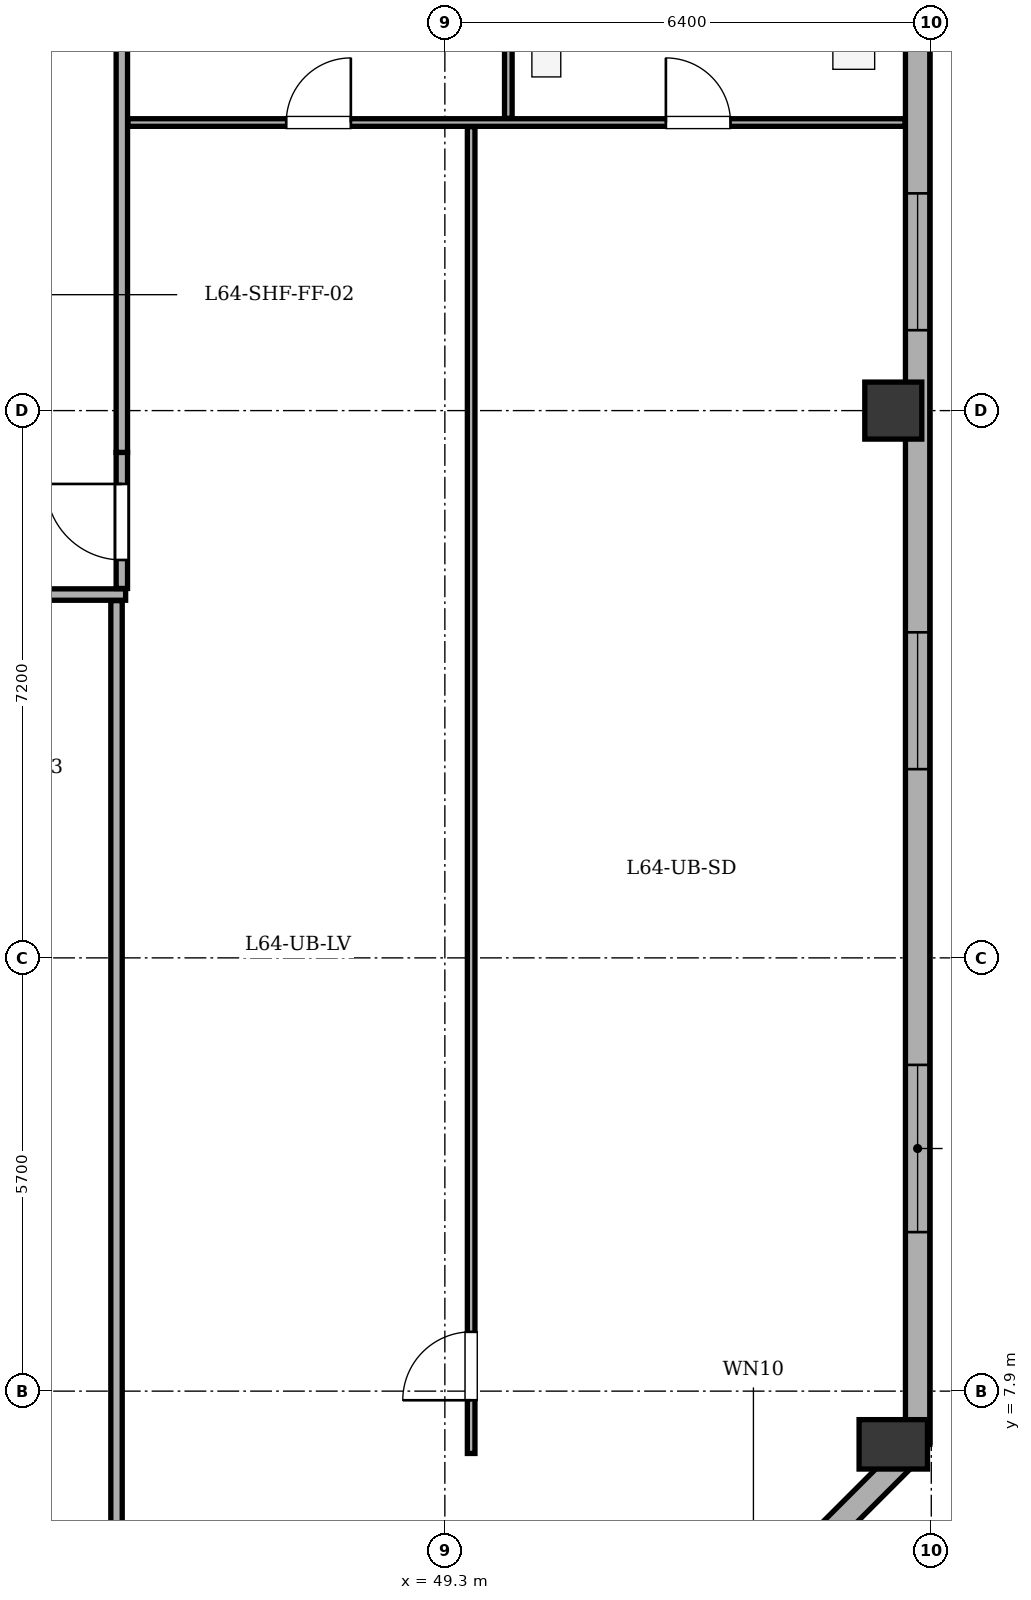
"""IFC4 building model, lengths in metres.
Left out: names, types, materials, properties, quantities, classifications, styles, units other than length and angle.
Written with IfcOpenShell. Run it as: python <this file> out.ifc"""

import sys

from ifc_helpers import new_model, si_unit, direction, frame, frame_2d, origin, origin_2d, place, context, subcontext, project, spatial, rectangle, extrude, element, fill, save


model = new_model("IFC4")
c1 = context("Model", 3, precision=1e-05, world=origin(), true_north=direction((0.0, 1.0)))
c2 = subcontext(c1, "Body", "Model", "MODEL_VIEW")
j1 = project(units=[si_unit("LENGTHUNIT", "METRE"), si_unit("PLANEANGLEUNIT", "RADIAN")], contexts=[c1])
p1 = place(None, origin())
s1 = spatial("IfcSite", under=j1, at=p1, CompositionType="ELEMENT")
p2 = place(p1, origin())
s2 = spatial("IfcBuilding", under=s1, at=p2, CompositionType="ELEMENT")
p3 = place(p2, frame((0.0, 0.0, 244.9)))
s3 = spatial("IfcBuildingStorey", under=s2, at=p3, CompositionType="ELEMENT", Elevation=244.9)
p4 = place(p3, frame((55.2, 7.2, 0.0), z_axis=(0.0, 0.0, 1.0), x_axis=(1.0, 0.0, 0.0)))
e1 = element("IfcColumn", 1, at=p4, inside=s3, PredefinedType="COLUMN", context=c2, shape_type="SweptSolid", body=[
    extrude(rectangle(XDim=0.65, YDim=0.9, at=origin_2d()), origin(), (0.0, 0.0, 1.0), 3.4),
])
p5 = place(p3, frame((55.2, 20.8, 0.0), z_axis=(0.0, 0.0, 1.0), x_axis=(1.0, 0.0, 0.0)))
e2 = element("IfcColumn", 2, at=p5, inside=s3, PredefinedType="COLUMN", context=c2, shape_type="SweptSolid", body=[
    extrude(rectangle(XDim=0.75, YDim=0.75, at=origin_2d()), origin(), (0.0, 0.0, 1.0), 3.4),
])
p6 = place(p3, frame((55.52, 35.0, 0.0), z_axis=(0.0, 0.0, 1.0), x_axis=(0.0, -1.0, 0.0)))
e3 = element("IfcWall", 3, at=p6, inside=s3, PredefinedType="STANDARD", context=c2, shape_type="SweptSolid", body=[
    extrude(rectangle(XDim=27.8, YDim=0.32, at=frame_2d((13.9, 0.0))), origin(), (0.0, 0.0, 1.0), 2.335),
])
p7 = place(p6, frame((2.458, 0.0, 0.75)))
e4 = element("IfcOpeningElement", 4, at=p7, cuts=e3, PredefinedType="OPENING", context=c2, shape_type="SweptSolid", body=[
    extrude(rectangle(XDim=1.8, YDim=1.465, at=frame_2d((0.9, 0.732))), frame((0.0, 0.17, 0.0), z_axis=(0.0, -1.0, 0.0), x_axis=(1.0, 0.0, 0.0)), (0.0, 0.0, 1.0), 0.34),
])
p8 = place(p6, frame((11.342, 0.0, 0.75)))
e5 = element("IfcOpeningElement", 5, at=p8, cuts=e3, PredefinedType="OPENING", context=c2, shape_type="SweptSolid", body=[
    extrude(rectangle(XDim=1.8, YDim=1.465, at=frame_2d((0.9, 0.732))), frame((0.0, 0.17, 0.0), z_axis=(0.0, -1.0, 0.0), x_axis=(1.0, 0.0, 0.0)), (0.0, 0.0, 1.0), 0.34),
])
p9 = place(p6, frame((17.117, 0.0, 0.75)))
e6 = element("IfcOpeningElement", 6, at=p9, cuts=e3, PredefinedType="OPENING", context=c2, shape_type="SweptSolid", body=[
    extrude(rectangle(XDim=1.8, YDim=1.465, at=frame_2d((0.9, 0.732))), frame((0.0, 0.17, 0.0), z_axis=(0.0, -1.0, 0.0), x_axis=(1.0, 0.0, 0.0)), (0.0, 0.0, 1.0), 0.34),
])
p10 = place(p6, frame((22.808, 0.0, 0.75)))
e7 = element("IfcOpeningElement", 7, at=p10, cuts=e3, PredefinedType="OPENING", context=c2, shape_type="SweptSolid", body=[
    extrude(rectangle(XDim=2.2, YDim=1.465, at=frame_2d((1.1, 0.732))), frame((0.0, 0.17, 0.0), z_axis=(0.0, -1.0, 0.0), x_axis=(1.0, 0.0, 0.0)), (0.0, 0.0, 1.0), 0.34),
])
p11 = place(p3, frame((55.52, 7.2, 0.0), z_axis=(0.0, 0.0, 1.0), x_axis=(-0.707106781187, -0.707106781187, 0.0)))
e8 = element("IfcWall", 8, at=p11, inside=s3, PredefinedType="STANDARD", context=c2, shape_type="SweptSolid", body=[
    extrude(rectangle(XDim=6.11, YDim=0.32, at=frame_2d((3.055, 0.0))), origin(), (0.0, 0.0, 1.0), 2.335),
])
p12 = place(p11, frame((2.355, 0.0, 0.75)))
e9 = element("IfcOpeningElement", 9, at=p12, cuts=e8, PredefinedType="OPENING", context=c2, shape_type="SweptSolid", body=[
    extrude(rectangle(XDim=1.4, YDim=1.465, at=frame_2d((0.7, 0.732))), frame((0.0, 0.17, 0.0), z_axis=(0.0, -1.0, 0.0), x_axis=(1.0, 0.0, 0.0)), (0.0, 0.0, 1.0), 0.34),
])
p13 = place(p3, frame((15.08, 18.38, 0.0), z_axis=(0.0, 0.0, 1.0), x_axis=(1.0, 0.0, 0.0)))
e10 = element("IfcWall", 10, at=p13, inside=s3, PredefinedType="PARTITIONING", context=c2, shape_type="SweptSolid", body=[
    extrude(rectangle(XDim=30.02, YDim=0.15, at=frame_2d((15.01, 0.0))), origin(), (0.0, 0.0, 1.0), 2.95),
])
p14 = place(p13, frame((14.51, 0.0, 0.0)))
e11 = element("IfcOpeningElement", 11, at=p14, cuts=e10, PredefinedType="OPENING", context=c2, shape_type="SweptSolid", body=[
    extrude(rectangle(XDim=1.0, YDim=2.1, at=frame_2d((0.5, 1.05))), frame((0.0, 0.085, 0.0), z_axis=(0.0, -1.0, 0.0), x_axis=(1.0, 0.0, 0.0)), (0.0, 0.0, 1.0), 0.17),
])
p15 = place(p3, frame((44.98, 3.045, 0.0), z_axis=(0.0, 0.0, 1.0), x_axis=(0.0, 1.0, 0.0)))
e12 = element("IfcWall", 12, at=p15, inside=s3, PredefinedType="PARTITIONING", context=c2, shape_type="SweptSolid", body=[
    extrude(rectangle(XDim=15.255, YDim=0.15, at=frame_2d((7.627, 0.0))), origin(), (0.0, 0.0, 1.0), 2.385),
])
p16 = place(p3, frame((45.05, 18.46, 0.0), z_axis=(0.0, 0.0, 1.0), x_axis=(0.0, 1.0, 0.0)))
e13 = element("IfcWall", 13, at=p16, inside=s3, PredefinedType="PARTITIONING", context=c2, shape_type="SweptSolid", body=[
    extrude(rectangle(XDim=1.79, YDim=0.15, at=frame_2d((0.895, 0.0))), origin(), (0.0, 0.0, 1.0), 2.385),
])
p17 = place(p16, frame((0.375, 0.0, 0.0)))
e14 = element("IfcOpeningElement", 14, at=p17, cuts=e13, PredefinedType="OPENING", context=c2, shape_type="SweptSolid", body=[
    extrude(rectangle(XDim=1.0, YDim=2.1, at=frame_2d((0.5, 1.05))), frame((0.0, 0.085, 0.0), z_axis=(0.0, -1.0, 0.0), x_axis=(1.0, 0.0, 0.0)), (0.0, 0.0, 1.0), 0.17),
])
p18 = place(p3, frame((45.05, 20.25, 0.0), z_axis=(0.0, 0.0, 1.0), x_axis=(0.0, 1.0, 0.0)))
e15 = element("IfcWall", 15, at=p18, inside=s3, PredefinedType="PARTITIONING", context=c2, shape_type="SweptSolid", body=[
    extrude(rectangle(XDim=13.9, YDim=0.15, at=frame_2d((6.95, 0.0))), origin(), (0.0, 0.0, 1.0), 2.385),
])
p19 = place(p3, frame((45.13, 24.59, 0.0), z_axis=(0.0, 0.0, 1.0), x_axis=(1.0, 0.0, 0.0)))
e16 = element("IfcWall", 16, at=p19, inside=s3, PredefinedType="PARTITIONING", context=c2, shape_type="SweptSolid", body=[
    extrude(rectangle(XDim=10.225, YDim=0.1, at=frame_2d((5.113, 0.0))), origin(), (0.0, 0.0, 1.0), 2.95),
])
p20 = place(p19, frame((2.083, 0.0, 0.0)))
e17 = element("IfcOpeningElement", 17, at=p20, cuts=e16, PredefinedType="OPENING", context=c2, shape_type="SweptSolid", body=[
    extrude(rectangle(XDim=0.85, YDim=2.05, at=frame_2d((0.425, 1.025))), frame((0.0, 0.06, 0.0), z_axis=(0.0, -1.0, 0.0), x_axis=(1.0, 0.0, 0.0)), (0.0, 0.0, 1.0), 0.12),
])
p21 = place(p19, frame((7.078, 0.0, 0.0)))
e18 = element("IfcOpeningElement", 18, at=p21, cuts=e16, PredefinedType="OPENING", context=c2, shape_type="SweptSolid", body=[
    extrude(rectangle(XDim=0.85, YDim=2.05, at=frame_2d((0.425, 1.025))), frame((0.0, 0.06, 0.0), z_axis=(0.0, -1.0, 0.0), x_axis=(1.0, 0.0, 0.0)), (0.0, 0.0, 1.0), 0.12),
])
p22 = place(p3, frame((49.646, 7.08, 0.0), z_axis=(0.0, 0.0, 1.0), x_axis=(0.0, 1.0, 0.0)))
e19 = element("IfcWall", 19, at=p22, inside=s3, PredefinedType="PARTITIONING", context=c2, shape_type="SweptSolid", body=[
    extrude(rectangle(XDim=17.455, YDim=0.1, at=frame_2d((8.728, 0.0))), origin(), (0.0, 0.0, 1.0), 2.95),
])
p23 = place(p22, frame((0.7, 0.0, 0.0)))
e20 = element("IfcOpeningElement", 20, at=p23, cuts=e19, PredefinedType="OPENING", context=c2, shape_type="SweptSolid", body=[
    extrude(rectangle(XDim=0.9, YDim=2.05, at=frame_2d((0.45, 1.025))), frame((0.0, 0.06, 0.0), z_axis=(0.0, -1.0, 0.0), x_axis=(1.0, 0.0, 0.0)), (0.0, 0.0, 1.0), 0.12),
])
p24 = place(p3, frame((50.135, 24.645, 0.0), z_axis=(0.0, 0.0, 1.0), x_axis=(0.0, 1.0, 0.0)))
e21 = element("IfcWall", 21, at=p24, inside=s3, PredefinedType="PARTITIONING", context=c2, shape_type="SweptSolid", body=[
    extrude(rectangle(XDim=2.475, YDim=0.1, at=frame_2d((1.238, 0.0))), origin(), (0.0, 0.0, 1.0), 2.95),
])
p25 = place(p8, origin())
e22 = element("IfcWindow", 22, at=p25, inside=s3, PartitioningType="SINGLE_PANEL", PredefinedType="WINDOW", context=c2, shape_type="SweptSolid", body=[
    extrude(rectangle(XDim=1.8, YDim=1.465, at=frame_2d((0.9, 0.732))), frame((0.0, -0.01, 0.0), z_axis=(0.0, -1.0, 0.0), x_axis=(1.0, 0.0, 0.0)), (0.0, 0.0, 1.0), 0.06),
])
fill(e5, e22)
p26 = place(p9, origin())
e23 = element("IfcWindow", 23, at=p26, inside=s3, PartitioningType="SINGLE_PANEL", PredefinedType="WINDOW", context=c2, shape_type="SweptSolid", body=[
    extrude(rectangle(XDim=1.8, YDim=1.465, at=frame_2d((0.9, 0.732))), frame((0.0, -0.01, 0.0), z_axis=(0.0, -1.0, 0.0), x_axis=(1.0, 0.0, 0.0)), (0.0, 0.0, 1.0), 0.06),
])
fill(e6, e23)
p27 = place(p10, origin())
e24 = element("IfcWindow", 24, at=p27, inside=s3, PartitioningType="SINGLE_PANEL", PredefinedType="WINDOW", context=c2, shape_type="SweptSolid", body=[
    extrude(rectangle(XDim=2.2, YDim=1.465, at=frame_2d((1.1, 0.732))), frame((0.0, -0.01, 0.0), z_axis=(0.0, -1.0, 0.0), x_axis=(1.0, 0.0, 0.0)), (0.0, 0.0, 1.0), 0.06),
])
fill(e7, e24)
p28 = place(p17, origin())
e25 = element("IfcDoor", 25, at=p28, inside=s3, OperationType="SINGLE_SWING_RIGHT", PredefinedType="DOOR", context=c2, shape_type="SweptSolid", body=[
    extrude(rectangle(XDim=1.0, YDim=2.1, at=frame_2d((0.5, 1.05))), frame((0.0, 0.025, 0.0), z_axis=(0.0, -1.0, 0.0), x_axis=(1.0, 0.0, 0.0)), (0.0, 0.0, 1.0), 0.05),
])
fill(e14, e25)
p29 = place(p23, origin())
e26 = element("IfcDoor", 26, at=p29, inside=s3, OperationType="SINGLE_SWING_LEFT", PredefinedType="DOOR", context=c2, shape_type="SweptSolid", body=[
    extrude(rectangle(XDim=0.9, YDim=2.05, at=frame_2d((0.45, 1.025))), frame((0.0, 0.025, 0.0), z_axis=(0.0, -1.0, 0.0), x_axis=(1.0, 0.0, 0.0)), (0.0, 0.0, 1.0), 0.05),
])
fill(e20, e26)
p30 = place(p20, origin())
e27 = element("IfcDoor", 27, at=p30, inside=s3, OperationType="SINGLE_SWING_RIGHT", PredefinedType="DOOR", context=c2, shape_type="SweptSolid", body=[
    extrude(rectangle(XDim=0.85, YDim=2.05, at=frame_2d((0.425, 1.025))), frame((0.0, 0.025, 0.0), z_axis=(0.0, -1.0, 0.0), x_axis=(1.0, 0.0, 0.0)), (0.0, 0.0, 1.0), 0.05),
])
fill(e17, e27)
p31 = place(p21, origin())
e28 = element("IfcDoor", 28, at=p31, inside=s3, OperationType="SINGLE_SWING_LEFT", PredefinedType="DOOR", context=c2, shape_type="SweptSolid", body=[
    extrude(rectangle(XDim=0.85, YDim=2.05, at=frame_2d((0.425, 1.025))), frame((0.0, 0.025, 0.0), z_axis=(0.0, -1.0, 0.0), x_axis=(1.0, 0.0, 0.0)), (0.0, 0.0, 1.0), 0.05),
])
fill(e18, e28)
save(model, sys.argv[1])
